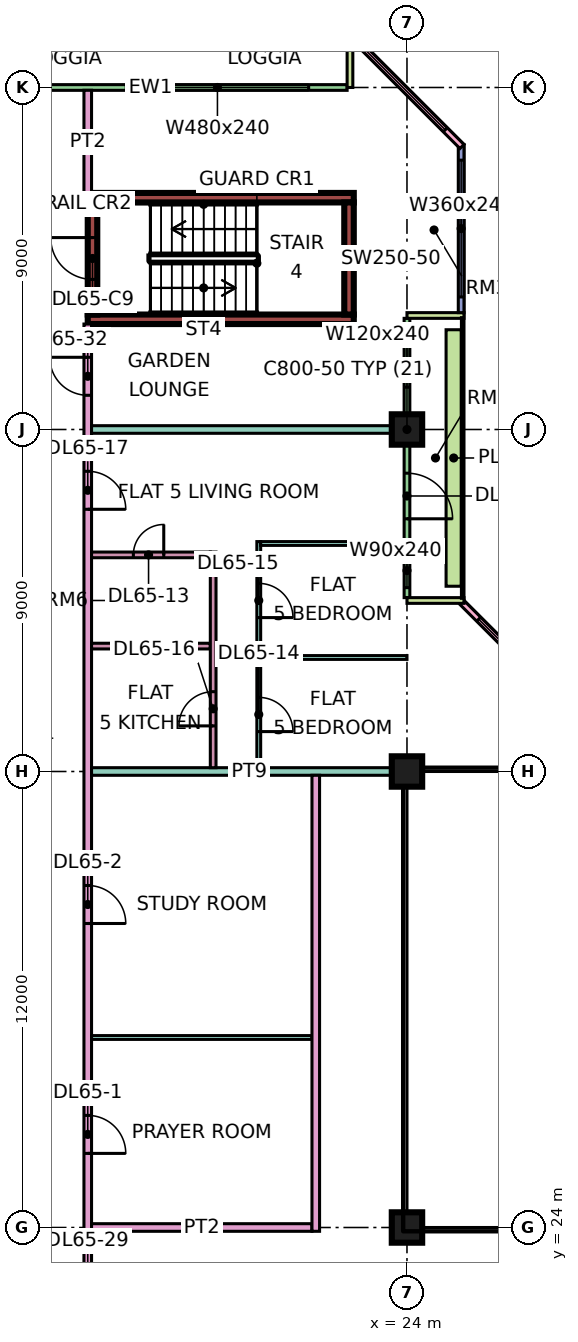
"""IFC4 building model, lengths in metres.
Left out: names, types, materials, properties, quantities, classifications, styles, units other than length and angle.
Written with IfcOpenShell. Run it as: python <this file> out.ifc"""

import sys

from ifc_helpers import new_model, si_unit, direction, frame, frame_2d, origin, origin_2d, place, context, subcontext, project, spatial, rectangle, extrude, element, fill, save


model = new_model("IFC4")
c1 = context("Model", 3, precision=1e-05, world=origin(), true_north=direction((0.0, 1.0)))
c2 = subcontext(c1, "Body", "Model", "MODEL_VIEW")
j1 = project(units=[si_unit("LENGTHUNIT", "METRE"), si_unit("PLANEANGLEUNIT", "RADIAN")], contexts=[c1])
p1 = place(None, origin())
s1 = spatial("IfcSite", under=j1, at=p1, CompositionType="ELEMENT")
p2 = place(p1, origin())
s2 = spatial("IfcBuilding", under=s1, at=p2, CompositionType="ELEMENT")
p3 = place(p2, frame((0.0, 0.0, 280.9)))
s3 = spatial("IfcBuildingStorey", under=s2, at=p3, CompositionType="ELEMENT", Elevation=280.9)
for number, where, z_axis, x_axis in (
    (1, (24.0, 24.0, 0.0), (0.0, 0.0, 1.0), (1.0, 0.0, 0.0)),
    (2, (24.0, 36.0, 0.0), (0.0, 0.0, 1.0), (1.0, 0.0, 0.0)),
    (3, (24.0, 45.0, 0.0), (0.0, 0.0, 1.0), (1.0, 0.0, 0.0)),
):
    element("IfcColumn", number, at=place(p3, frame(where, z_axis=z_axis, x_axis=x_axis)), inside=s3, PredefinedType="COLUMN", context=c2, shape_type="SweptSolid", body=[
        extrude(rectangle(XDim=0.8, YDim=0.8, at=origin_2d()), origin(), (0.0, 0.0, 1.0), 3.75),
    ])
for number, where, z_axis, x_axis in (
    (4, (15.6, 47.9, 0.0), (0.0, 0.0, 1.0), (1.0, 0.0, 0.0)),
    (5, (15.6, 51.1, 0.0), (0.0, 0.0, 1.0), (1.0, 0.0, 0.0)),
):
    element("IfcWall", number, at=place(p3, frame(where, z_axis=z_axis, x_axis=x_axis)), inside=s3, PredefinedType="SHEAR", context=c2, shape_type="SweptSolid", body=[
        extrude(rectangle(XDim=7.0, YDim=0.25, at=frame_2d((3.5, 0.0))), origin(), (0.0, 0.0, 1.0), 3.75),
    ])
p4 = place(p3, frame((15.725, 48.025, 0.0), z_axis=(0.0, 0.0, 1.0), x_axis=(0.0, 1.0, 0.0)))
e6 = element("IfcWall", 6, at=p4, inside=s3, PredefinedType="SHEAR", context=c2, shape_type="SweptSolid", body=[
    extrude(rectangle(XDim=2.95, YDim=0.25, at=frame_2d((1.475, 0.0))), origin(), (0.0, 0.0, 1.0), 3.75),
])
p5 = place(p4, frame((0.925, 0.0, 0.0)))
e7 = element("IfcOpeningElement", 7, at=p5, cuts=e6, PredefinedType="OPENING", context=c2, shape_type="SweptSolid", body=[
    extrude(rectangle(XDim=1.1, YDim=2.2, at=frame_2d((0.55, 1.1))), frame((0.0, 0.135, 0.0), z_axis=(0.0, -1.0, 0.0), x_axis=(1.0, 0.0, 0.0)), (0.0, 0.0, 1.0), 0.27),
])
p6 = place(p3, frame((22.475, 48.025, 0.0), z_axis=(0.0, 0.0, 1.0), x_axis=(0.0, 1.0, 0.0)))
e8 = element("IfcWall", 8, at=p6, inside=s3, PredefinedType="SHEAR", context=c2, shape_type="SweptSolid", body=[
    extrude(rectangle(XDim=2.95, YDim=0.25, at=frame_2d((1.475, 0.0))), origin(), (0.0, 0.0, 1.0), 3.75),
])
p7 = place(p3, frame((28.447, 37.447, 0.0), z_axis=(0.0, 0.0, 1.0), x_axis=(-0.707106781187, 0.707106781187, 0.0)))
e9 = element("IfcWall", 9, at=p7, inside=s3, PredefinedType="SOLIDWALL", context=c2, shape_type="SweptSolid", body=[
    extrude(rectangle(XDim=4.243, YDim=0.15, at=frame_2d((2.121, 0.0))), origin(), (0.0, 0.0, 1.0), 3.35),
])
p8 = place(p7, frame((0.621, 0.0, 0.45)))
e10 = element("IfcOpeningElement", 10, at=p8, cuts=e9, PredefinedType="OPENING", context=c2, shape_type="SweptSolid", body=[
    extrude(rectangle(XDim=3.0, YDim=2.4, at=frame_2d((1.5, 1.2))), frame((0.0, 0.085, 0.0), z_axis=(0.0, -1.0, 0.0), x_axis=(1.0, 0.0, 0.0)), (0.0, 0.0, 1.0), 0.17),
])
p9 = place(p3, frame((24.0, 40.575, 0.0), z_axis=(0.0, 0.0, 1.0), x_axis=(0.0, 1.0, 0.0)))
e11 = element("IfcWall", 11, at=p9, inside=s3, PredefinedType="SOLIDWALL", context=c2, shape_type="SweptSolid", body=[
    extrude(rectangle(XDim=7.35, YDim=0.15, at=frame_2d((3.675, 0.0))), origin(), (0.0, 0.0, 1.0), 3.35),
])
p10 = place(p9, frame((0.262, 0.0, 0.45)))
e12 = element("IfcOpeningElement", 12, at=p10, cuts=e11, PredefinedType="OPENING", context=c2, shape_type="SweptSolid", body=[
    extrude(rectangle(XDim=0.9, YDim=2.4, at=frame_2d((0.45, 1.2))), frame((0.0, 0.085, 0.0), z_axis=(0.0, -1.0, 0.0), x_axis=(1.0, 0.0, 0.0)), (0.0, 0.0, 1.0), 0.17),
])
p11 = place(p9, frame((2.075, 0.0, 0.0)))
e13 = element("IfcOpeningElement", 13, at=p11, cuts=e11, PredefinedType="OPENING", context=c2, shape_type="SweptSolid", body=[
    extrude(rectangle(XDim=1.2, YDim=2.4, at=frame_2d((0.6, 1.2))), frame((0.0, 0.085, 0.0), z_axis=(0.0, -1.0, 0.0), x_axis=(1.0, 0.0, 0.0)), (0.0, 0.0, 1.0), 0.17),
])
p12 = place(p9, frame((5.538, 0.0, 0.45)))
e14 = element("IfcOpeningElement", 14, at=p12, cuts=e11, PredefinedType="OPENING", context=c2, shape_type="SweptSolid", body=[
    extrude(rectangle(XDim=1.2, YDim=2.4, at=frame_2d((0.6, 1.2))), frame((0.0, 0.085, 0.0), z_axis=(0.0, -1.0, 0.0), x_axis=(1.0, 0.0, 0.0)), (0.0, 0.0, 1.0), 0.17),
])
for number, where, z_axis, x_axis in (
    (15, (25.5, 40.5, 0.0), (0.0, 0.0, 1.0), (-1.0, 0.0, 0.0)),
    (16, (25.5, 48.0, 0.0), (0.0, 0.0, 1.0), (-1.0, 0.0, 0.0)),
):
    element("IfcWall", number, at=place(p3, frame(where, z_axis=z_axis, x_axis=x_axis)), inside=s3, PredefinedType="SOLIDWALL", context=c2, shape_type="SweptSolid", body=[
        extrude(rectangle(XDim=1.5, YDim=0.15, at=frame_2d((0.75, 0.0))), origin(), (0.0, 0.0, 1.0), 3.35),
    ])
p13 = place(p3, frame((25.425, 48.075, 0.0), z_axis=(0.0, 0.0, 1.0), x_axis=(0.0, 1.0, 0.0)))
e17 = element("IfcWall", 17, at=p13, inside=s3, PredefinedType="SOLIDWALL", context=c2, shape_type="SweptSolid", body=[
    extrude(rectangle(XDim=4.425, YDim=0.15, at=frame_2d((2.212, 0.0))), origin(), (0.0, 0.0, 1.0), 3.35),
])
p14 = place(p13, frame((0.413, 0.0, 0.45)))
e18 = element("IfcOpeningElement", 18, at=p14, cuts=e17, PredefinedType="OPENING", context=c2, shape_type="SweptSolid", body=[
    extrude(rectangle(XDim=3.6, YDim=2.4, at=frame_2d((1.8, 1.2))), frame((0.0, 0.085, 0.0), z_axis=(0.0, -1.0, 0.0), x_axis=(1.0, 0.0, 0.0)), (0.0, 0.0, 1.0), 0.17),
])
p15 = place(p3, frame((25.447, 52.447, 0.0), z_axis=(0.0, 0.0, 1.0), x_axis=(-0.707106781187, 0.707106781187, 0.0)))
e19 = element("IfcWall", 19, at=p15, inside=s3, PredefinedType="SOLIDWALL", context=c2, shape_type="SweptSolid", body=[
    extrude(rectangle(XDim=4.243, YDim=0.15, at=frame_2d((2.121, 0.0))), origin(), (0.0, 0.0, 1.0), 3.35),
])
p16 = place(p15, frame((0.621, 0.0, 0.45)))
e20 = element("IfcOpeningElement", 20, at=p16, cuts=e19, PredefinedType="OPENING", context=c2, shape_type="SweptSolid", body=[
    extrude(rectangle(XDim=3.0, YDim=2.4, at=frame_2d((1.5, 1.2))), frame((0.0, 0.085, 0.0), z_axis=(0.0, -1.0, 0.0), x_axis=(1.0, 0.0, 0.0)), (0.0, 0.0, 1.0), 0.17),
])
p17 = place(p3, frame((22.425, 54.0, 0.0), z_axis=(0.0, 0.0, 1.0), x_axis=(-1.0, 0.0, 0.0)))
e21 = element("IfcWall", 21, at=p17, inside=s3, PredefinedType="SOLIDWALL", context=c2, shape_type="SweptSolid", body=[
    extrude(rectangle(XDim=10.35, YDim=0.15, at=frame_2d((5.175, 0.0))), origin(), (0.0, 0.0, 1.0), 3.35),
])
p18 = place(p17, frame((1.012, 0.0, 0.45)))
e22 = element("IfcOpeningElement", 22, at=p18, cuts=e21, PredefinedType="OPENING", context=c2, shape_type="SweptSolid", body=[
    extrude(rectangle(XDim=4.8, YDim=2.4, at=frame_2d((2.4, 1.2))), frame((0.0, 0.085, 0.0), z_axis=(0.0, -1.0, 0.0), x_axis=(1.0, 0.0, 0.0)), (0.0, 0.0, 1.0), 0.17),
])
p19 = place(p3, frame((22.5, 55.5, 0.0), z_axis=(0.0, 0.0, 1.0), x_axis=(0.0, -1.0, 0.0)))
e23 = element("IfcWall", 23, at=p19, inside=s3, PredefinedType="SOLIDWALL", context=c2, shape_type="SweptSolid", body=[
    extrude(rectangle(XDim=1.5, YDim=0.15, at=frame_2d((0.75, 0.0))), origin(), (0.0, 0.0, 1.0), 3.35),
])
p20 = place(p3, frame((25.229, 40.875, 0.0), z_axis=(0.0, 0.0, 1.0), x_axis=(0.0, 1.0, 0.0)))
e24 = element("IfcWall", 24, at=p20, inside=s3, PredefinedType="SOLIDWALL", context=c2, shape_type="SweptSolid", body=[
    extrude(rectangle(XDim=6.75, YDim=0.4, at=frame_2d((3.375, 0.0))), origin(), (0.0, 0.0, 1.0), 0.7),
])
p21 = place(p3, frame((15.6, 20.0, 0.0), z_axis=(0.0, 0.0, 1.0), x_axis=(0.0, 1.0, 0.0)))
e25 = element("IfcWall", 25, at=p21, inside=s3, PredefinedType="PARTITIONING", context=c2, shape_type="SweptSolid", body=[
    extrude(rectangle(XDim=27.775, YDim=0.2, at=frame_2d((13.887, 0.0))), origin(), (0.0, 0.0, 1.0), 3.35),
])
p22 = place(p21, frame((5.95, 0.0, 0.0)))
e26 = element("IfcOpeningElement", 26, at=p22, cuts=e25, PredefinedType="OPENING", context=c2, shape_type="SweptSolid", body=[
    extrude(rectangle(XDim=1.0, YDim=2.1, at=frame_2d((0.5, 1.05))), frame((0.0, 0.11, 0.0), z_axis=(0.0, -1.0, 0.0), x_axis=(1.0, 0.0, 0.0)), (0.0, 0.0, 1.0), 0.22),
])
p23 = place(p21, frame((12.0, 0.0, 0.0)))
e27 = element("IfcOpeningElement", 27, at=p23, cuts=e25, PredefinedType="OPENING", context=c2, shape_type="SweptSolid", body=[
    extrude(rectangle(XDim=1.0, YDim=2.1, at=frame_2d((0.5, 1.05))), frame((0.0, 0.11, 0.0), z_axis=(0.0, -1.0, 0.0), x_axis=(1.0, 0.0, 0.0)), (0.0, 0.0, 1.0), 0.22),
])
p24 = place(p21, frame((22.9, 0.0, 0.0)))
e28 = element("IfcOpeningElement", 28, at=p24, cuts=e25, PredefinedType="OPENING", context=c2, shape_type="SweptSolid", body=[
    extrude(rectangle(XDim=1.0, YDim=2.1, at=frame_2d((0.5, 1.05))), frame((0.0, 0.11, 0.0), z_axis=(0.0, -1.0, 0.0), x_axis=(1.0, 0.0, 0.0)), (0.0, 0.0, 1.0), 0.22),
])
p25 = place(p21, frame((1.15, 0.0, 0.0)))
e29 = element("IfcOpeningElement", 29, at=p25, cuts=e25, PredefinedType="OPENING", context=c2, shape_type="SweptSolid", body=[
    extrude(rectangle(XDim=1.8, YDim=2.1, at=frame_2d((0.9, 1.05))), frame((0.0, 0.11, 0.0), z_axis=(0.0, -1.0, 0.0), x_axis=(1.0, 0.0, 0.0)), (0.0, 0.0, 1.0), 0.22),
])
p26 = place(p21, frame((25.9, 0.0, 0.0)))
e30 = element("IfcOpeningElement", 30, at=p26, cuts=e25, PredefinedType="OPENING", context=c2, shape_type="SweptSolid", body=[
    extrude(rectangle(XDim=1.0, YDim=2.1, at=frame_2d((0.5, 1.05))), frame((0.0, 0.11, 0.0), z_axis=(0.0, -1.0, 0.0), x_axis=(1.0, 0.0, 0.0)), (0.0, 0.0, 1.0), 0.22),
])
p27 = place(p3, frame((15.6, 51.225, 0.0), z_axis=(0.0, 0.0, 1.0), x_axis=(0.0, 1.0, 0.0)))
e31 = element("IfcWall", 31, at=p27, inside=s3, PredefinedType="PARTITIONING", context=c2, shape_type="SweptSolid", body=[
    extrude(rectangle(XDim=2.701, YDim=0.2, at=frame_2d((1.351, 0.0))), origin(), (0.0, 0.0, 1.0), 3.35),
])
p28 = place(p3, frame((15.7, 24.0, 0.0), z_axis=(0.0, 0.0, 1.0), x_axis=(1.0, 0.0, 0.0)))
e32 = element("IfcWall", 32, at=p28, inside=s3, PredefinedType="PARTITIONING", context=c2, shape_type="SweptSolid", body=[
    extrude(rectangle(XDim=5.8, YDim=0.2, at=frame_2d((2.9, 0.0))), origin(), (0.0, 0.0, 1.0), 3.35),
])
p29 = place(p3, frame((15.7, 29.0, 0.0), z_axis=(0.0, 0.0, 1.0), x_axis=(1.0, 0.0, 0.0)))
e33 = element("IfcWall", 33, at=p29, inside=s3, PredefinedType="PARTITIONING", context=c2, shape_type="SweptSolid", body=[
    extrude(rectangle(XDim=5.8, YDim=0.1, at=frame_2d((2.9, 0.0))), origin(), (0.0, 0.0, 1.0), 3.35),
])
p30 = place(p3, frame((15.7, 36.0, 0.0), z_axis=(0.0, 0.0, 1.0), x_axis=(1.0, 0.0, 0.0)))
e34 = element("IfcWall", 34, at=p30, inside=s3, PredefinedType="PARTITIONING", context=c2, shape_type="SweptSolid", body=[
    extrude(rectangle(XDim=8.3, YDim=0.2, at=frame_2d((4.15, 0.0))), origin(), (0.0, 0.0, 1.0), 3.35),
])
p31 = place(p3, frame((15.7, 39.3, 0.0), z_axis=(0.0, 0.0, 1.0), x_axis=(1.0, 0.0, 0.0)))
e35 = element("IfcWall", 35, at=p31, inside=s3, PredefinedType="PARTITIONING", context=c2, shape_type="SweptSolid", body=[
    extrude(rectangle(XDim=3.125, YDim=0.15, at=frame_2d((1.562, 0.0))), origin(), (0.0, 0.0, 1.0), 3.35),
])
p32 = place(p3, frame((15.7, 41.7, 0.0), z_axis=(0.0, 0.0, 1.0), x_axis=(1.0, 0.0, 0.0)))
e36 = element("IfcWall", 36, at=p32, inside=s3, PredefinedType="PARTITIONING", context=c2, shape_type="SweptSolid", body=[
    extrude(rectangle(XDim=3.125, YDim=0.15, at=frame_2d((1.562, 0.0))), origin(), (0.0, 0.0, 1.0), 3.35),
])
p33 = place(p32, frame((1.1, 0.0, 0.0)))
e37 = element("IfcOpeningElement", 37, at=p33, cuts=e36, PredefinedType="OPENING", context=c2, shape_type="SweptSolid", body=[
    extrude(rectangle(XDim=0.8, YDim=2.1, at=frame_2d((0.4, 1.05))), frame((0.0, 0.085, 0.0), z_axis=(0.0, -1.0, 0.0), x_axis=(1.0, 0.0, 0.0)), (0.0, 0.0, 1.0), 0.17),
])
p34 = place(p3, frame((15.7, 45.0, 0.0), z_axis=(0.0, 0.0, 1.0), x_axis=(1.0, 0.0, 0.0)))
e38 = element("IfcWall", 38, at=p34, inside=s3, PredefinedType="PARTITIONING", context=c2, shape_type="SweptSolid", body=[
    extrude(rectangle(XDim=8.226, YDim=0.2, at=frame_2d((4.113, 0.0))), origin(), (0.0, 0.0, 1.0), 3.35),
])
p35 = place(p3, frame((18.9, 36.1, 0.0), z_axis=(0.0, 0.0, 1.0), x_axis=(0.0, 1.0, 0.0)))
e39 = element("IfcWall", 39, at=p35, inside=s3, PredefinedType="PARTITIONING", context=c2, shape_type="SweptSolid", body=[
    extrude(rectangle(XDim=5.675, YDim=0.15, at=frame_2d((2.837, 0.0))), origin(), (0.0, 0.0, 1.0), 3.35),
])
p36 = place(p35, frame((1.1, 0.0, 0.0)))
e40 = element("IfcOpeningElement", 40, at=p36, cuts=e39, PredefinedType="OPENING", context=c2, shape_type="SweptSolid", body=[
    extrude(rectangle(XDim=0.9, YDim=2.1, at=frame_2d((0.45, 1.05))), frame((0.0, 0.085, 0.0), z_axis=(0.0, -1.0, 0.0), x_axis=(1.0, 0.0, 0.0)), (0.0, 0.0, 1.0), 0.17),
])
p37 = place(p3, frame((20.1, 36.1, 0.0), z_axis=(0.0, 0.0, 1.0), x_axis=(0.0, 1.0, 0.0)))
e41 = element("IfcWall", 41, at=p37, inside=s3, PredefinedType="PARTITIONING", context=c2, shape_type="SweptSolid", body=[
    extrude(rectangle(XDim=5.95, YDim=0.1, at=frame_2d((2.975, 0.0))), origin(), (0.0, 0.0, 1.0), 3.35),
])
p38 = place(p37, frame((0.95, 0.0, 0.0)))
e42 = element("IfcOpeningElement", 42, at=p38, cuts=e41, PredefinedType="OPENING", context=c2, shape_type="SweptSolid", body=[
    extrude(rectangle(XDim=0.9, YDim=2.1, at=frame_2d((0.45, 1.05))), frame((0.0, 0.06, 0.0), z_axis=(0.0, -1.0, 0.0), x_axis=(1.0, 0.0, 0.0)), (0.0, 0.0, 1.0), 0.12),
])
p39 = place(p37, frame((3.95, 0.0, 0.0)))
e43 = element("IfcOpeningElement", 43, at=p39, cuts=e41, PredefinedType="OPENING", context=c2, shape_type="SweptSolid", body=[
    extrude(rectangle(XDim=0.9, YDim=2.1, at=frame_2d((0.45, 1.05))), frame((0.0, 0.06, 0.0), z_axis=(0.0, -1.0, 0.0), x_axis=(1.0, 0.0, 0.0)), (0.0, 0.0, 1.0), 0.12),
])
p40 = place(p3, frame((20.15, 39.0, 0.0), z_axis=(0.0, 0.0, 1.0), x_axis=(1.0, 0.0, 0.0)))
e44 = element("IfcWall", 44, at=p40, inside=s3, PredefinedType="PARTITIONING", context=c2, shape_type="SweptSolid", body=[
    extrude(rectangle(XDim=3.85, YDim=0.1, at=frame_2d((1.925, 0.0))), origin(), (0.0, 0.0, 1.0), 3.35),
])
p41 = place(p3, frame((20.15, 42.0, 0.0), z_axis=(0.0, 0.0, 1.0), x_axis=(1.0, 0.0, 0.0)))
e45 = element("IfcWall", 45, at=p41, inside=s3, PredefinedType="PARTITIONING", context=c2, shape_type="SweptSolid", body=[
    extrude(rectangle(XDim=3.776, YDim=0.1, at=frame_2d((1.888, 0.0))), origin(), (0.0, 0.0, 1.0), 3.35),
])
p42 = place(p3, frame((21.6, 23.9, 0.0), z_axis=(0.0, 0.0, 1.0), x_axis=(0.0, 1.0, 0.0)))
e46 = element("IfcWall", 46, at=p42, inside=s3, PredefinedType="PARTITIONING", context=c2, shape_type="SweptSolid", body=[
    extrude(rectangle(XDim=12.0, YDim=0.2, at=frame_2d((6.0, 0.0))), origin(), (0.0, 0.0, 1.0), 3.35),
])
p43 = place(p8, origin())
e47 = element("IfcWindow", 47, at=p43, inside=s3, PartitioningType="SINGLE_PANEL", PredefinedType="WINDOW", context=c2, shape_type="SweptSolid", body=[
    extrude(rectangle(XDim=3.0, YDim=2.4, at=frame_2d((1.5, 1.2))), frame((0.0, 0.03, 0.0), z_axis=(0.0, -1.0, 0.0), x_axis=(1.0, 0.0, 0.0)), (0.0, 0.0, 1.0), 0.06),
])
fill(e10, e47)
p44 = place(p10, origin())
e48 = element("IfcWindow", 48, at=p44, inside=s3, PartitioningType="SINGLE_PANEL", PredefinedType="WINDOW", context=c2, shape_type="SweptSolid", body=[
    extrude(rectangle(XDim=0.9, YDim=2.4, at=frame_2d((0.45, 1.2))), frame((0.0, 0.03, 0.0), z_axis=(0.0, -1.0, 0.0), x_axis=(1.0, 0.0, 0.0)), (0.0, 0.0, 1.0), 0.06),
])
fill(e12, e48)
p45 = place(p11, frame((1.2, 0.0, 0.0), z_axis=(0.0, 0.0, 1.0), x_axis=(-1.0, 0.0, 0.0)))
e49 = element("IfcDoor", 49, at=p45, inside=s3, OperationType="DOUBLE_DOOR_SINGLE_SWING", PredefinedType="DOOR", context=c2, shape_type="SweptSolid", body=[
    extrude(rectangle(XDim=1.2, YDim=2.4, at=frame_2d((0.6, 1.2))), frame((0.0, 0.025, 0.0), z_axis=(0.0, -1.0, 0.0), x_axis=(1.0, 0.0, 0.0)), (0.0, 0.0, 1.0), 0.05),
])
fill(e13, e49)
p46 = place(p12, origin())
e50 = element("IfcWindow", 50, at=p46, inside=s3, PartitioningType="SINGLE_PANEL", PredefinedType="WINDOW", context=c2, shape_type="SweptSolid", body=[
    extrude(rectangle(XDim=1.2, YDim=2.4, at=frame_2d((0.6, 1.2))), frame((0.0, 0.03, 0.0), z_axis=(0.0, -1.0, 0.0), x_axis=(1.0, 0.0, 0.0)), (0.0, 0.0, 1.0), 0.06),
])
fill(e14, e50)
p47 = place(p14, origin())
e51 = element("IfcWindow", 51, at=p47, inside=s3, PartitioningType="SINGLE_PANEL", PredefinedType="WINDOW", context=c2, shape_type="SweptSolid", body=[
    extrude(rectangle(XDim=3.6, YDim=2.4, at=frame_2d((1.8, 1.2))), frame((0.0, 0.03, 0.0), z_axis=(0.0, -1.0, 0.0), x_axis=(1.0, 0.0, 0.0)), (0.0, 0.0, 1.0), 0.06),
])
fill(e18, e51)
p48 = place(p16, origin())
e52 = element("IfcWindow", 52, at=p48, inside=s3, PartitioningType="SINGLE_PANEL", PredefinedType="WINDOW", context=c2, shape_type="SweptSolid", body=[
    extrude(rectangle(XDim=3.0, YDim=2.4, at=frame_2d((1.5, 1.2))), frame((0.0, 0.03, 0.0), z_axis=(0.0, -1.0, 0.0), x_axis=(1.0, 0.0, 0.0)), (0.0, 0.0, 1.0), 0.06),
])
fill(e20, e52)
p49 = place(p18, origin())
e53 = element("IfcWindow", 53, at=p49, inside=s3, PartitioningType="SINGLE_PANEL", PredefinedType="WINDOW", context=c2, shape_type="SweptSolid", body=[
    extrude(rectangle(XDim=4.8, YDim=2.4, at=frame_2d((2.4, 1.2))), frame((0.0, 0.03, 0.0), z_axis=(0.0, -1.0, 0.0), x_axis=(1.0, 0.0, 0.0)), (0.0, 0.0, 1.0), 0.06),
])
fill(e22, e53)
p50 = place(p5, frame((1.1, 0.0, 0.0), z_axis=(0.0, 0.0, 1.0), x_axis=(-1.0, 0.0, 0.0)))
e54 = element("IfcDoor", 54, at=p50, inside=s3, OperationType="SINGLE_SWING_RIGHT", PredefinedType="DOOR", context=c2, shape_type="SweptSolid", body=[
    extrude(rectangle(XDim=1.1, YDim=2.2, at=frame_2d((0.55, 1.1))), frame((0.0, 0.025, 0.0), z_axis=(0.0, -1.0, 0.0), x_axis=(1.0, 0.0, 0.0)), (0.0, 0.0, 1.0), 0.05),
])
fill(e7, e54)
p51 = place(p22, frame((1.0, 0.0, 0.0), z_axis=(0.0, 0.0, 1.0), x_axis=(-1.0, 0.0, 0.0)))
e55 = element("IfcDoor", 55, at=p51, inside=s3, OperationType="SINGLE_SWING_LEFT", PredefinedType="DOOR", context=c2, shape_type="SweptSolid", body=[
    extrude(rectangle(XDim=1.0, YDim=2.1, at=frame_2d((0.5, 1.05))), frame((0.0, 0.025, 0.0), z_axis=(0.0, -1.0, 0.0), x_axis=(1.0, 0.0, 0.0)), (0.0, 0.0, 1.0), 0.05),
])
fill(e26, e55)
p52 = place(p23, frame((1.0, 0.0, 0.0), z_axis=(0.0, 0.0, 1.0), x_axis=(-1.0, 0.0, 0.0)))
e56 = element("IfcDoor", 56, at=p52, inside=s3, OperationType="SINGLE_SWING_LEFT", PredefinedType="DOOR", context=c2, shape_type="SweptSolid", body=[
    extrude(rectangle(XDim=1.0, YDim=2.1, at=frame_2d((0.5, 1.05))), frame((0.0, 0.025, 0.0), z_axis=(0.0, -1.0, 0.0), x_axis=(1.0, 0.0, 0.0)), (0.0, 0.0, 1.0), 0.05),
])
fill(e27, e56)
p53 = place(p33, frame((0.8, 0.0, 0.0), z_axis=(0.0, 0.0, 1.0), x_axis=(-1.0, 0.0, 0.0)))
e57 = element("IfcDoor", 57, at=p53, inside=s3, OperationType="SINGLE_SWING_RIGHT", PredefinedType="DOOR", context=c2, shape_type="SweptSolid", body=[
    extrude(rectangle(XDim=0.8, YDim=2.1, at=frame_2d((0.4, 1.05))), frame((0.0, 0.025, 0.0), z_axis=(0.0, -1.0, 0.0), x_axis=(1.0, 0.0, 0.0)), (0.0, 0.0, 1.0), 0.05),
])
fill(e37, e57)
p54 = place(p38, frame((0.9, 0.0, 0.0), z_axis=(0.0, 0.0, 1.0), x_axis=(-1.0, 0.0, 0.0)))
e58 = element("IfcDoor", 58, at=p54, inside=s3, OperationType="SINGLE_SWING_LEFT", PredefinedType="DOOR", context=c2, shape_type="SweptSolid", body=[
    extrude(rectangle(XDim=0.9, YDim=2.1, at=frame_2d((0.45, 1.05))), frame((0.0, 0.025, 0.0), z_axis=(0.0, -1.0, 0.0), x_axis=(1.0, 0.0, 0.0)), (0.0, 0.0, 1.0), 0.05),
])
fill(e42, e58)
p55 = place(p39, frame((0.9, 0.0, 0.0), z_axis=(0.0, 0.0, 1.0), x_axis=(-1.0, 0.0, 0.0)))
e59 = element("IfcDoor", 59, at=p55, inside=s3, OperationType="SINGLE_SWING_LEFT", PredefinedType="DOOR", context=c2, shape_type="SweptSolid", body=[
    extrude(rectangle(XDim=0.9, YDim=2.1, at=frame_2d((0.45, 1.05))), frame((0.0, 0.025, 0.0), z_axis=(0.0, -1.0, 0.0), x_axis=(1.0, 0.0, 0.0)), (0.0, 0.0, 1.0), 0.05),
])
fill(e43, e59)
p56 = place(p36, origin())
e60 = element("IfcDoor", 60, at=p56, inside=s3, OperationType="SINGLE_SWING_LEFT", PredefinedType="DOOR", context=c2, shape_type="SweptSolid", body=[
    extrude(rectangle(XDim=0.9, YDim=2.1, at=frame_2d((0.45, 1.05))), frame((0.0, 0.025, 0.0), z_axis=(0.0, -1.0, 0.0), x_axis=(1.0, 0.0, 0.0)), (0.0, 0.0, 1.0), 0.05),
])
fill(e40, e60)
p57 = place(p24, frame((1.0, 0.0, 0.0), z_axis=(0.0, 0.0, 1.0), x_axis=(-1.0, 0.0, 0.0)))
e61 = element("IfcDoor", 61, at=p57, inside=s3, OperationType="SINGLE_SWING_LEFT", PredefinedType="DOOR", context=c2, shape_type="SweptSolid", body=[
    extrude(rectangle(XDim=1.0, YDim=2.1, at=frame_2d((0.5, 1.05))), frame((0.0, 0.025, 0.0), z_axis=(0.0, -1.0, 0.0), x_axis=(1.0, 0.0, 0.0)), (0.0, 0.0, 1.0), 0.05),
])
fill(e28, e61)
p58 = place(p26, frame((1.0, 0.0, 0.0), z_axis=(0.0, 0.0, 1.0), x_axis=(-1.0, 0.0, 0.0)))
e62 = element("IfcDoor", 62, at=p58, inside=s3, OperationType="SINGLE_SWING_RIGHT", PredefinedType="DOOR", context=c2, shape_type="SweptSolid", body=[
    extrude(rectangle(XDim=1.0, YDim=2.1, at=frame_2d((0.5, 1.05))), frame((0.0, 0.025, 0.0), z_axis=(0.0, -1.0, 0.0), x_axis=(1.0, 0.0, 0.0)), (0.0, 0.0, 1.0), 0.05),
])
fill(e30, e62)
save(model, sys.argv[1])
